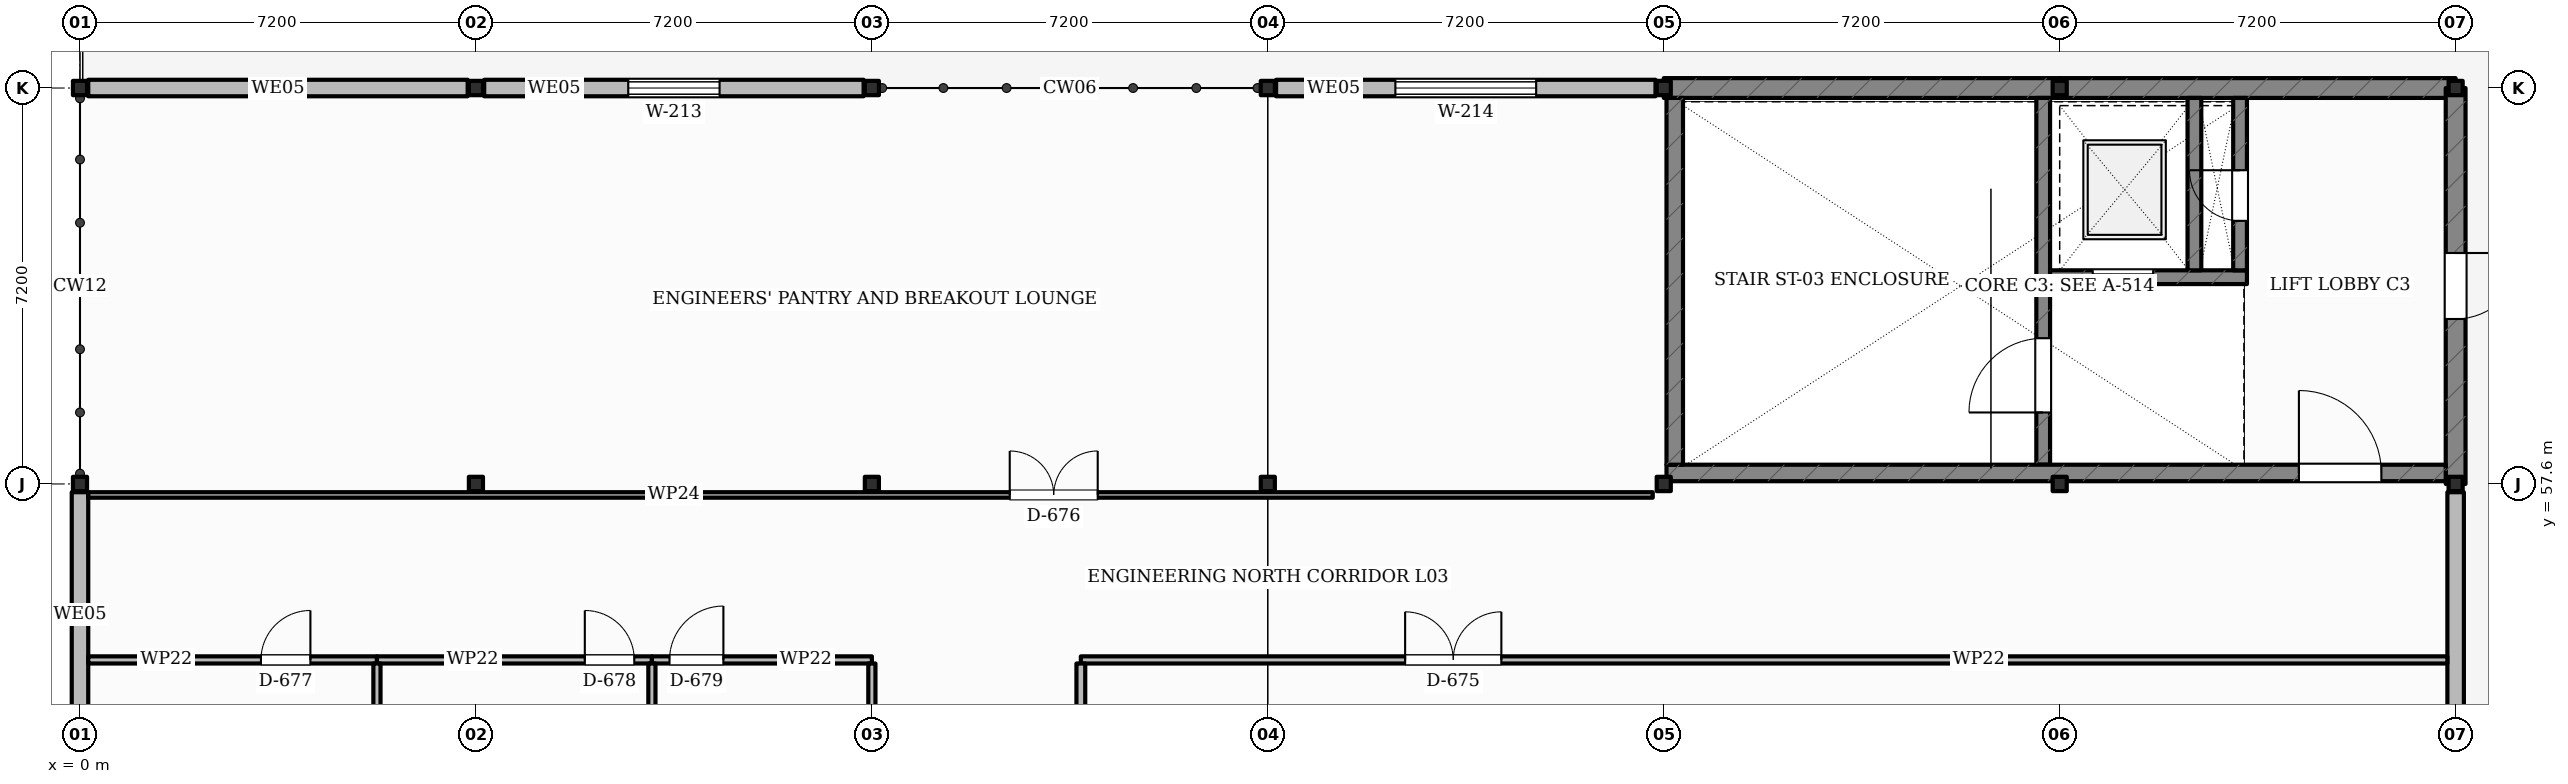
"""IFC4 building model, lengths in metres.
Left out: names, types, materials, properties, quantities, classifications, styles, units other than length and angle.
Written with IfcOpenShell. Run it as: python <this file> out.ifc"""

import sys

from ifc_helpers import new_model, si_unit, direction, frame, frame_2d, origin, origin_2d, place, context, subcontext, project, spatial, rectangle, i_section, extrude, element, fill, save


model = new_model("IFC4")
c1 = context("Model", 3, precision=1e-05, world=origin(), true_north=direction((0.0, 1.0)))
c2 = subcontext(c1, "Body", "Model", "MODEL_VIEW")
j1 = project(units=[si_unit("LENGTHUNIT", "METRE"), si_unit("PLANEANGLEUNIT", "RADIAN")], contexts=[c1])
p1 = place(None, origin())
s1 = spatial("IfcSite", under=j1, at=p1, CompositionType="ELEMENT")
p2 = place(p1, origin())
s2 = spatial("IfcBuilding", under=s1, at=p2, CompositionType="ELEMENT")
p3 = place(p2, frame((0.0, 0.0, 14.4)))
s3 = spatial("IfcBuildingStorey", under=s2, at=p3, CompositionType="ELEMENT", Elevation=14.4)
for number, where, z_axis, x_axis in (
    (1, (0.0, 57.6, 0.0), (0.0, 0.0, 1.0), (1.0, 0.0, 0.0)),
    (2, (0.0, 64.8, 0.0), (0.0, 0.0, 1.0), (1.0, 0.0, 0.0)),
    (3, (7.2, 57.6, 0.0), (0.0, 0.0, 1.0), (1.0, 0.0, 0.0)),
    (4, (7.2, 64.8, 0.0), (0.0, 0.0, 1.0), (1.0, 0.0, 0.0)),
    (5, (14.4, 57.6, 0.0), (0.0, 0.0, 1.0), (1.0, 0.0, 0.0)),
    (6, (14.4, 64.8, 0.0), (0.0, 0.0, 1.0), (1.0, 0.0, 0.0)),
    (7, (21.6, 57.6, 0.0), (0.0, 0.0, 1.0), (1.0, 0.0, 0.0)),
    (8, (21.6, 64.8, 0.0), (0.0, 0.0, 1.0), (1.0, 0.0, 0.0)),
    (9, (28.8, 57.6, 0.0), (0.0, 0.0, 1.0), (1.0, 0.0, 0.0)),
    (10, (28.8, 64.8, 0.0), (0.0, 0.0, 1.0), (1.0, 0.0, 0.0)),
    (11, (36.0, 57.6, 0.0), (0.0, 0.0, 1.0), (1.0, 0.0, 0.0)),
    (12, (36.0, 64.8, 0.0), (0.0, 0.0, 1.0), (1.0, 0.0, 0.0)),
    (13, (43.2, 57.6, 0.0), (0.0, 0.0, 1.0), (1.0, 0.0, 0.0)),
    (14, (43.2, 64.8, 0.0), (0.0, 0.0, 1.0), (1.0, 0.0, 0.0)),
):
    element("IfcColumn", number, at=place(p3, frame(where, z_axis=z_axis, x_axis=x_axis)), inside=s3, PredefinedType="COLUMN", context=c2, shape_type="SweptSolid", body=[
        extrude(i_section(OverallWidth=0.256, OverallDepth=0.26, WebThickness=0.01, FlangeThickness=0.017, FilletRadius=0.013, at=origin_2d()), origin(), (0.0, 0.0, 1.0), 4.5),
    ])
p4 = place(p3, frame((0.0, 50.55, 0.0), z_axis=(0.0, 0.0, 1.0), x_axis=(0.0, 1.0, 0.0)))
e15 = element("IfcWall", 15, at=p4, inside=s3, PredefinedType="SOLIDWALL", context=c2, shape_type="SweptSolid", body=[
    extrude(rectangle(XDim=6.9, YDim=0.3, at=frame_2d((3.45, 0.0))), origin(), (0.0, 0.0, 1.0), 3.85),
])
p5 = place(p4, frame((1.6, 0.0, 1.05)))
e16 = element("IfcOpeningElement", 16, at=p5, cuts=e15, PredefinedType="OPENING", context=c2, shape_type="SweptSolid", body=[
    extrude(rectangle(XDim=0.8, YDim=1.4, at=frame_2d((0.4, 0.7))), frame((0.0, 0.16, 0.0), z_axis=(0.0, -1.0, 0.0), x_axis=(1.0, 0.0, 0.0)), (0.0, 0.0, 1.0), 0.32),
])
p6 = place(p3, frame((0.15, 64.8, 0.0), z_axis=(0.0, 0.0, 1.0), x_axis=(1.0, 0.0, 0.0)))
e17 = element("IfcWall", 17, at=p6, inside=s3, PredefinedType="SOLIDWALL", context=c2, shape_type="SweptSolid", body=[
    extrude(rectangle(XDim=6.9, YDim=0.3, at=frame_2d((3.45, 0.0))), origin(), (0.0, 0.0, 1.0), 3.85),
])
p7 = place(p3, frame((7.35, 64.8, 0.0), z_axis=(0.0, 0.0, 1.0), x_axis=(1.0, 0.0, 0.0)))
e18 = element("IfcWall", 18, at=p7, inside=s3, PredefinedType="SOLIDWALL", context=c2, shape_type="SweptSolid", body=[
    extrude(rectangle(XDim=6.9, YDim=0.3, at=frame_2d((3.45, 0.0))), origin(), (0.0, 0.0, 1.0), 3.85),
])
p8 = place(p7, frame((2.62, 0.0, 1.05)))
e19 = element("IfcOpeningElement", 19, at=p8, cuts=e18, PredefinedType="OPENING", context=c2, shape_type="SweptSolid", body=[
    extrude(rectangle(XDim=1.66, YDim=1.8, at=frame_2d((0.83, 0.9))), frame((0.0, 0.16, 0.0), z_axis=(0.0, -1.0, 0.0), x_axis=(1.0, 0.0, 0.0)), (0.0, 0.0, 1.0), 0.32),
])
p9 = place(p3, frame((21.75, 64.8, 0.0), z_axis=(0.0, 0.0, 1.0), x_axis=(1.0, 0.0, 0.0)))
e20 = element("IfcWall", 20, at=p9, inside=s3, PredefinedType="SOLIDWALL", context=c2, shape_type="SweptSolid", body=[
    extrude(rectangle(XDim=6.9, YDim=0.3, at=frame_2d((3.45, 0.0))), origin(), (0.0, 0.0, 1.0), 3.414),
])
p10 = place(p9, frame((2.17, 0.0, 1.05)))
e21 = element("IfcOpeningElement", 21, at=p10, cuts=e20, PredefinedType="OPENING", context=c2, shape_type="SweptSolid", body=[
    extrude(rectangle(XDim=2.56, YDim=1.55, at=frame_2d((1.28, 0.775))), frame((0.0, 0.16, 0.0), z_axis=(0.0, -1.0, 0.0), x_axis=(1.0, 0.0, 0.0)), (0.0, 0.0, 1.0), 0.32),
])
p11 = place(p3, frame((28.8, 64.8, 0.0), z_axis=(0.0, 0.0, 1.0), x_axis=(1.0, 0.0, 0.0)))
e22 = element("IfcWall", 22, at=p11, inside=s3, PredefinedType="SHEAR", context=c2, shape_type="SweptSolid", body=[
    extrude(rectangle(XDim=7.2, YDim=0.36, at=frame_2d((3.6, 0.0))), origin(), (0.0, 0.0, 1.0), 3.414),
])
p12 = place(p3, frame((36.0, 64.8, 0.0), z_axis=(0.0, 0.0, 1.0), x_axis=(1.0, 0.0, 0.0)))
e23 = element("IfcWall", 23, at=p12, inside=s3, PredefinedType="SHEAR", context=c2, shape_type="SweptSolid", body=[
    extrude(rectangle(XDim=7.2, YDim=0.36, at=frame_2d((3.6, 0.0))), origin(), (0.0, 0.0, 1.0), 3.503),
])
p13 = place(p3, frame((43.2, 64.8, 0.0), z_axis=(0.0, 0.0, 1.0), x_axis=(0.0, -1.0, 0.0)))
e24 = element("IfcWall", 24, at=p13, inside=s3, PredefinedType="SHEAR", context=c2, shape_type="SweptSolid", body=[
    extrude(rectangle(XDim=7.2, YDim=0.36, at=frame_2d((3.6, 0.0))), origin(), (0.0, 0.0, 1.0), 3.503),
])
p14 = place(p13, frame((3.0, 0.0, 0.0)))
e25 = element("IfcOpeningElement", 25, at=p14, cuts=e24, PredefinedType="OPENING", context=c2, shape_type="SweptSolid", body=[
    extrude(rectangle(XDim=1.2, YDim=2.15, at=frame_2d((0.6, 1.075))), frame((0.0, 0.19, 0.0), z_axis=(0.0, -1.0, 0.0), x_axis=(1.0, 0.0, 0.0)), (0.0, 0.0, 1.0), 0.38),
])
p15 = place(p3, frame((43.2, 57.45, 0.0), z_axis=(0.0, 0.0, 1.0), x_axis=(0.0, -1.0, 0.0)))
e26 = element("IfcWall", 26, at=p15, inside=s3, PredefinedType="SOLIDWALL", context=c2, shape_type="SweptSolid", body=[
    extrude(rectangle(XDim=6.9, YDim=0.3, at=frame_2d((3.45, 0.0))), origin(), (0.0, 0.0, 1.0), 3.503),
])
p16 = place(p15, frame((4.07, 0.0, 1.05)))
e27 = element("IfcOpeningElement", 27, at=p16, cuts=e26, PredefinedType="OPENING", context=c2, shape_type="SweptSolid", body=[
    extrude(rectangle(XDim=1.66, YDim=1.8, at=frame_2d((0.83, 0.9))), frame((0.0, 0.16, 0.0), z_axis=(0.0, -1.0, 0.0), x_axis=(1.0, 0.0, 0.0)), (0.0, 0.0, 1.0), 0.32),
])
p17 = place(p3, frame((35.7, 57.95, 0.0), z_axis=(0.0, 0.0, 1.0), x_axis=(0.0, 1.0, 0.0)))
e28 = element("IfcWall", 28, at=p17, inside=s3, PredefinedType="SHEAR", context=c2, shape_type="SweptSolid", body=[
    extrude(rectangle(XDim=6.67, YDim=0.25, at=frame_2d((3.335, 0.0))), origin(), (0.0, 0.0, 1.0), 3.6),
])
p18 = place(p17, frame((0.95, 0.0, 0.0)))
e29 = element("IfcOpeningElement", 29, at=p18, cuts=e28, PredefinedType="OPENING", context=c2, shape_type="SweptSolid", body=[
    extrude(rectangle(XDim=1.35, YDim=2.15, at=frame_2d((0.675, 1.075))), frame((0.0, 0.135, 0.0), z_axis=(0.0, -1.0, 0.0), x_axis=(1.0, 0.0, 0.0)), (0.0, 0.0, 1.0), 0.27),
])
p19 = place(p3, frame((35.825, 61.36, 0.0), z_axis=(0.0, 0.0, 1.0), x_axis=(1.0, 0.0, 0.0)))
e30 = element("IfcWall", 30, at=p19, inside=s3, PredefinedType="SHEAR", context=c2, shape_type="SweptSolid", body=[
    extrude(rectangle(XDim=3.58, YDim=0.25, at=frame_2d((1.79, 0.0))), origin(), (0.0, 0.0, 1.0), 3.6),
])
p20 = place(p19, frame((0.775, 0.0, 0.0)))
e31 = element("IfcOpeningElement", 31, at=p20, cuts=e30, PredefinedType="OPENING", context=c2, shape_type="SweptSolid", body=[
    extrude(rectangle(XDim=1.1, YDim=2.15, at=frame_2d((0.55, 1.075))), frame((0.0, 0.135, 0.0), z_axis=(0.0, -1.0, 0.0), x_axis=(1.0, 0.0, 0.0)), (0.0, 0.0, 1.0), 0.27),
])
p21 = place(p3, frame((38.45, 61.485, 0.0), z_axis=(0.0, 0.0, 1.0), x_axis=(0.0, 1.0, 0.0)))
e32 = element("IfcWall", 32, at=p21, inside=s3, PredefinedType="SHEAR", context=c2, shape_type="SweptSolid", body=[
    extrude(rectangle(XDim=3.135, YDim=0.25, at=frame_2d((1.567, 0.0))), origin(), (0.0, 0.0, 1.0), 3.6),
])
p22 = place(p3, frame((39.28, 61.485, 0.0), z_axis=(0.0, 0.0, 1.0), x_axis=(0.0, 1.0, 0.0)))
e33 = element("IfcWall", 33, at=p22, inside=s3, PredefinedType="SHEAR", context=c2, shape_type="SweptSolid", body=[
    extrude(rectangle(XDim=3.135, YDim=0.25, at=frame_2d((1.567, 0.0))), origin(), (0.0, 0.0, 1.0), 3.6),
])
p23 = place(p22, frame((0.9, 0.0, 0.0)))
e34 = element("IfcOpeningElement", 34, at=p23, cuts=e33, PredefinedType="OPENING", context=c2, shape_type="SweptSolid", body=[
    extrude(rectangle(XDim=0.92, YDim=2.05, at=frame_2d((0.46, 1.025))), frame((0.0, 0.135, 0.0), z_axis=(0.0, -1.0, 0.0), x_axis=(1.0, 0.0, 0.0)), (0.0, 0.0, 1.0), 0.27),
])
p24 = place(p3, frame((28.85, 57.8, 0.0), z_axis=(0.0, 0.0, 1.0), x_axis=(1.0, 0.0, 0.0)))
e35 = element("IfcWall", 35, at=p24, inside=s3, PredefinedType="SHEAR", context=c2, shape_type="SweptSolid", body=[
    extrude(rectangle(XDim=14.17, YDim=0.3, at=frame_2d((7.085, 0.0))), origin(), (0.0, 0.0, 1.0), 3.6),
])
p25 = place(p24, frame((11.5, 0.0, 0.0)))
e36 = element("IfcOpeningElement", 36, at=p25, cuts=e35, PredefinedType="OPENING", context=c2, shape_type="SweptSolid", body=[
    extrude(rectangle(XDim=1.5, YDim=2.15, at=frame_2d((0.75, 1.075))), frame((0.0, 0.16, 0.0), z_axis=(0.0, -1.0, 0.0), x_axis=(1.0, 0.0, 0.0)), (0.0, 0.0, 1.0), 0.32),
])
p26 = place(p3, frame((29.0, 57.95, 0.0), z_axis=(0.0, 0.0, 1.0), x_axis=(0.0, 1.0, 0.0)))
e37 = element("IfcWall", 37, at=p26, inside=s3, PredefinedType="SHEAR", context=c2, shape_type="SweptSolid", body=[
    extrude(rectangle(XDim=6.67, YDim=0.3, at=frame_2d((3.335, 0.0))), origin(), (0.0, 0.0, 1.0), 3.6),
])
p27 = place(p3, frame((18.2, 54.4, 0.0), z_axis=(0.0, 0.0, 1.0), x_axis=(1.0, 0.0, 0.0)))
e38 = element("IfcWall", 38, at=p27, inside=s3, PredefinedType="PARTITIONING", context=c2, shape_type="SweptSolid", body=[
    extrude(rectangle(XDim=24.85, YDim=0.13, at=frame_2d((12.425, 0.0))), origin(), (0.0, 0.0, 1.0), 3.55),
])
p28 = place(p27, frame((5.897, 0.0, 0.0)))
e39 = element("IfcOpeningElement", 39, at=p28, cuts=e38, PredefinedType="OPENING", context=c2, shape_type="SweptSolid", body=[
    extrude(rectangle(XDim=1.75, YDim=2.25, at=frame_2d((0.875, 1.125))), frame((0.0, 0.075, 0.0), z_axis=(0.0, -1.0, 0.0), x_axis=(1.0, 0.0, 0.0)), (0.0, 0.0, 1.0), 0.15),
])
p29 = place(p3, frame((0.15, 57.4, 0.0), z_axis=(0.0, 0.0, 1.0), x_axis=(1.0, 0.0, 0.0)))
e40 = element("IfcWall", 40, at=p29, inside=s3, PredefinedType="PARTITIONING", context=c2, shape_type="SweptSolid", body=[
    extrude(rectangle(XDim=28.45, YDim=0.1, at=frame_2d((14.225, 0.0))), origin(), (0.0, 0.0, 1.0), 3.55),
])
p30 = place(p29, frame((16.757, 0.0, 0.0)))
e41 = element("IfcOpeningElement", 41, at=p30, cuts=e40, PredefinedType="OPENING", context=c2, shape_type="SweptSolid", body=[
    extrude(rectangle(XDim=1.6, YDim=2.2, at=frame_2d((0.8, 1.1))), frame((0.0, 0.06, 0.0), z_axis=(0.0, -1.0, 0.0), x_axis=(1.0, 0.0, 0.0)), (0.0, 0.0, 1.0), 0.12),
])
p31 = place(p3, frame((0.15, 54.4, 0.0), z_axis=(0.0, 0.0, 1.0), x_axis=(1.0, 0.0, 0.0)))
e42 = element("IfcWall", 42, at=p31, inside=s3, PredefinedType="PARTITIONING", context=c2, shape_type="SweptSolid", body=[
    extrude(rectangle(XDim=5.25, YDim=0.13, at=frame_2d((2.625, 0.0))), origin(), (0.0, 0.0, 1.0), 3.55),
])
p32 = place(p31, frame((3.14, 0.0, 0.0)))
e43 = element("IfcOpeningElement", 43, at=p32, cuts=e42, PredefinedType="OPENING", context=c2, shape_type="SweptSolid", body=[
    extrude(rectangle(XDim=0.9, YDim=2.05, at=frame_2d((0.45, 1.025))), frame((0.0, 0.075, 0.0), z_axis=(0.0, -1.0, 0.0), x_axis=(1.0, 0.0, 0.0)), (0.0, 0.0, 1.0), 0.15),
])
p33 = place(p3, frame((5.4, 54.4, 0.0), z_axis=(0.0, 0.0, 1.0), x_axis=(1.0, 0.0, 0.0)))
e44 = element("IfcWall", 44, at=p33, inside=s3, PredefinedType="PARTITIONING", context=c2, shape_type="SweptSolid", body=[
    extrude(rectangle(XDim=5.0, YDim=0.13, at=frame_2d((2.5, 0.0))), origin(), (0.0, 0.0, 1.0), 3.55),
])
p34 = place(p33, frame((3.78, 0.0, 0.0)))
e45 = element("IfcOpeningElement", 45, at=p34, cuts=e44, PredefinedType="OPENING", context=c2, shape_type="SweptSolid", body=[
    extrude(rectangle(XDim=0.9, YDim=2.05, at=frame_2d((0.45, 1.025))), frame((0.0, 0.075, 0.0), z_axis=(0.0, -1.0, 0.0), x_axis=(1.0, 0.0, 0.0)), (0.0, 0.0, 1.0), 0.15),
])
p35 = place(p3, frame((10.4, 54.4, 0.0), z_axis=(0.0, 0.0, 1.0), x_axis=(1.0, 0.0, 0.0)))
e46 = element("IfcWall", 46, at=p35, inside=s3, PredefinedType="PARTITIONING", context=c2, shape_type="SweptSolid", body=[
    extrude(rectangle(XDim=4.0, YDim=0.13, at=frame_2d((2.0, 0.0))), origin(), (0.0, 0.0, 1.0), 3.55),
])
p36 = place(p35, frame((0.32, 0.0, 0.0)))
e47 = element("IfcOpeningElement", 47, at=p36, cuts=e46, PredefinedType="OPENING", context=c2, shape_type="SweptSolid", body=[
    extrude(rectangle(XDim=0.98, YDim=2.1, at=frame_2d((0.49, 1.05))), frame((0.0, 0.075, 0.0), z_axis=(0.0, -1.0, 0.0), x_axis=(1.0, 0.0, 0.0)), (0.0, 0.0, 1.0), 0.15),
])
p37 = place(p3, frame((18.2, 44.28, 0.0), z_axis=(0.0, 0.0, 1.0), x_axis=(0.0, 1.0, 0.0)))
e48 = element("IfcWall", 48, at=p37, inside=s3, PredefinedType="PARTITIONING", context=c2, shape_type="SweptSolid", body=[
    extrude(rectangle(XDim=10.055, YDim=0.16, at=frame_2d((5.027, 0.0))), origin(), (0.0, 0.0, 1.0), 3.55),
])
for number, where, z_axis, x_axis in (
    (49, (5.4, 50.35, 0.0), (0.0, 0.0, 1.0), (0.0, 1.0, 0.0)),
    (50, (10.4, 50.35, 0.0), (0.0, 0.0, 1.0), (0.0, 1.0, 0.0)),
):
    element("IfcWall", number, at=place(p3, frame(where, z_axis=z_axis, x_axis=x_axis)), inside=s3, PredefinedType="PARTITIONING", context=c2, shape_type="SweptSolid", body=[
        extrude(rectangle(XDim=3.985, YDim=0.13, at=frame_2d((1.992, 0.0))), origin(), (0.0, 0.0, 1.0), 3.55),
    ])
p38 = place(p3, frame((14.4, 50.532, 0.0), z_axis=(0.0, 0.0, 1.0), x_axis=(0.0, 1.0, 0.0)))
e51 = element("IfcWall", 51, at=p38, inside=s3, PredefinedType="PARTITIONING", context=c2, shape_type="SweptSolid", body=[
    extrude(rectangle(XDim=3.803, YDim=0.13, at=frame_2d((1.901, 0.0))), origin(), (0.0, 0.0, 1.0), 3.55),
])
p39 = place(p8, origin())
e52 = element("IfcWindow", 52, at=p39, inside=s3, PartitioningType="SINGLE_PANEL", PredefinedType="WINDOW", context=c2, shape_type="SweptSolid", body=[
    extrude(rectangle(XDim=1.66, YDim=1.8, at=frame_2d((0.83, 0.9))), frame((0.0, 0.03, 0.0), z_axis=(0.0, -1.0, 0.0), x_axis=(1.0, 0.0, 0.0)), (0.0, 0.0, 1.0), 0.06),
])
fill(e19, e52)
p40 = place(p10, origin())
e53 = element("IfcWindow", 53, at=p40, inside=s3, PartitioningType="SINGLE_PANEL", PredefinedType="WINDOW", context=c2, shape_type="SweptSolid", body=[
    extrude(rectangle(XDim=2.56, YDim=1.55, at=frame_2d((1.28, 0.775))), frame((0.0, 0.03, 0.0), z_axis=(0.0, -1.0, 0.0), x_axis=(1.0, 0.0, 0.0)), (0.0, 0.0, 1.0), 0.06),
])
fill(e21, e53)
p41 = place(p14, origin())
e54 = element("IfcDoor", 54, at=p41, inside=s3, OperationType="SINGLE_SWING_LEFT", PredefinedType="DOOR", context=c2, shape_type="SweptSolid", body=[
    extrude(rectangle(XDim=1.2, YDim=2.15, at=frame_2d((0.6, 1.075))), frame((0.0, 0.025, 0.0), z_axis=(0.0, -1.0, 0.0), x_axis=(1.0, 0.0, 0.0)), (0.0, 0.0, 1.0), 0.05),
])
fill(e25, e54)
p42 = place(p18, origin())
e55 = element("IfcDoor", 55, at=p42, inside=s3, OperationType="SINGLE_SWING_LEFT", PredefinedType="DOOR", context=c2, shape_type="SweptSolid", body=[
    extrude(rectangle(XDim=1.35, YDim=2.15, at=frame_2d((0.675, 1.075))), frame((0.0, 0.025, 0.0), z_axis=(0.0, -1.0, 0.0), x_axis=(1.0, 0.0, 0.0)), (0.0, 0.0, 1.0), 0.05),
])
fill(e29, e55)
p43 = place(p20, origin())
e56 = element("IfcDoor", 56, at=p43, inside=s3, OperationType="SLIDING_TO_LEFT", PredefinedType="DOOR", context=c2, shape_type="SweptSolid", body=[
    extrude(rectangle(XDim=1.1, YDim=2.15, at=frame_2d((0.55, 1.075))), frame((0.0, 0.025, 0.0), z_axis=(0.0, -1.0, 0.0), x_axis=(1.0, 0.0, 0.0)), (0.0, 0.0, 1.0), 0.05),
])
fill(e31, e56)
p44 = place(p23, origin())
e57 = element("IfcDoor", 57, at=p44, inside=s3, OperationType="SINGLE_SWING_RIGHT", PredefinedType="DOOR", context=c2, shape_type="SweptSolid", body=[
    extrude(rectangle(XDim=0.92, YDim=2.05, at=frame_2d((0.46, 1.025))), frame((0.0, 0.025, 0.0), z_axis=(0.0, -1.0, 0.0), x_axis=(1.0, 0.0, 0.0)), (0.0, 0.0, 1.0), 0.05),
])
fill(e34, e57)
p45 = place(p25, origin())
e58 = element("IfcDoor", 58, at=p45, inside=s3, OperationType="SINGLE_SWING_LEFT", PredefinedType="DOOR", context=c2, shape_type="SweptSolid", body=[
    extrude(rectangle(XDim=1.5, YDim=2.15, at=frame_2d((0.75, 1.075))), frame((0.0, 0.025, 0.0), z_axis=(0.0, -1.0, 0.0), x_axis=(1.0, 0.0, 0.0)), (0.0, 0.0, 1.0), 0.05),
])
fill(e36, e58)
p46 = place(p28, origin())
e59 = element("IfcDoor", 59, at=p46, inside=s3, OperationType="DOUBLE_SWING_LEFT", PredefinedType="DOOR", context=c2, shape_type="SweptSolid", body=[
    extrude(rectangle(XDim=1.75, YDim=2.25, at=frame_2d((0.875, 1.125))), frame((0.0, 0.025, 0.0), z_axis=(0.0, -1.0, 0.0), x_axis=(1.0, 0.0, 0.0)), (0.0, 0.0, 1.0), 0.05),
])
fill(e39, e59)
p47 = place(p30, origin())
e60 = element("IfcDoor", 60, at=p47, inside=s3, OperationType="DOUBLE_SWING_LEFT", PredefinedType="DOOR", context=c2, shape_type="SweptSolid", body=[
    extrude(rectangle(XDim=1.6, YDim=2.2, at=frame_2d((0.8, 1.1))), frame((0.0, 0.025, 0.0), z_axis=(0.0, -1.0, 0.0), x_axis=(1.0, 0.0, 0.0)), (0.0, 0.0, 1.0), 0.05),
])
fill(e41, e60)
p48 = place(p32, origin())
e61 = element("IfcDoor", 61, at=p48, inside=s3, OperationType="SINGLE_SWING_RIGHT", PredefinedType="DOOR", context=c2, shape_type="SweptSolid", body=[
    extrude(rectangle(XDim=0.9, YDim=2.05, at=frame_2d((0.45, 1.025))), frame((0.0, 0.025, 0.0), z_axis=(0.0, -1.0, 0.0), x_axis=(1.0, 0.0, 0.0)), (0.0, 0.0, 1.0), 0.05),
])
fill(e43, e61)
p49 = place(p34, origin())
e62 = element("IfcDoor", 62, at=p49, inside=s3, OperationType="SINGLE_SWING_LEFT", PredefinedType="DOOR", context=c2, shape_type="SweptSolid", body=[
    extrude(rectangle(XDim=0.9, YDim=2.05, at=frame_2d((0.45, 1.025))), frame((0.0, 0.025, 0.0), z_axis=(0.0, -1.0, 0.0), x_axis=(1.0, 0.0, 0.0)), (0.0, 0.0, 1.0), 0.05),
])
fill(e45, e62)
p50 = place(p36, origin())
e63 = element("IfcDoor", 63, at=p50, inside=s3, OperationType="SINGLE_SWING_RIGHT", PredefinedType="DOOR", context=c2, shape_type="SweptSolid", body=[
    extrude(rectangle(XDim=0.98, YDim=2.1, at=frame_2d((0.49, 1.05))), frame((0.0, 0.025, 0.0), z_axis=(0.0, -1.0, 0.0), x_axis=(1.0, 0.0, 0.0)), (0.0, 0.0, 1.0), 0.05),
])
fill(e47, e63)
save(model, sys.argv[1])
